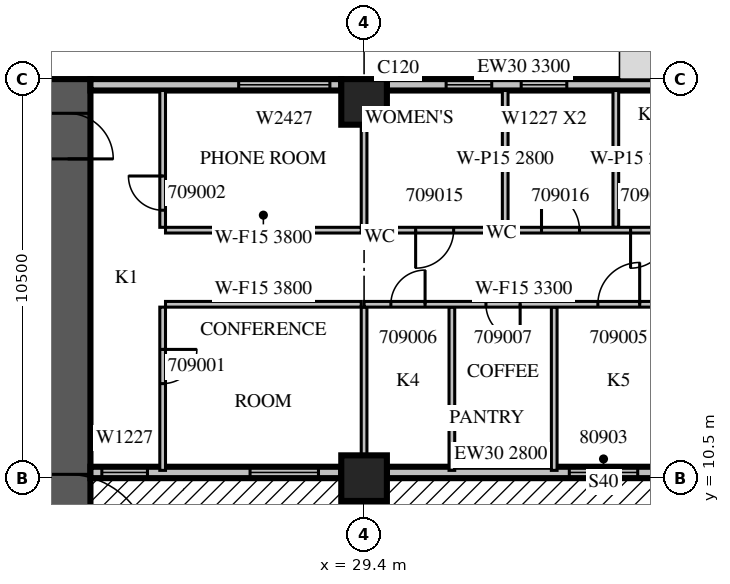
"""IFC4 building model, lengths in metres.
Left out: names, types, materials, properties, quantities, classifications, styles, units other than length and angle.
Written with IfcOpenShell. Run it as: python <this file> out.ifc"""

import sys

from ifc_helpers import new_model, si_unit, direction, frame, frame_2d, origin, origin_2d, place, context, subcontext, project, spatial, rectangle, extrude, source, transform, mapped, element, fill, save


model = new_model("IFC4")
c1 = context("Model", 3, precision=1e-05, world=origin(), true_north=direction((0.0, 1.0)))
c2 = subcontext(c1, "Body", "Model", "MODEL_VIEW")
j1 = project(units=[si_unit("LENGTHUNIT", "METRE"), si_unit("PLANEANGLEUNIT", "RADIAN")], contexts=[c1])
p1 = place(None, origin())
s1 = spatial("IfcSite", under=j1, at=p1, CompositionType="ELEMENT")
p2 = place(p1, origin())
s2 = spatial("IfcBuilding", under=s1, at=p2, CompositionType="ELEMENT")
p3 = place(p2, frame((0.0, 0.0, 48.9)))
s3 = spatial("IfcBuildingStorey", under=s2, at=p3, CompositionType="ELEMENT", Elevation=48.9)
m1 = source(origin(), c2, "Body", "SweptSolid", [
    extrude(rectangle(XDim=1.2, YDim=1.2, at=origin_2d()), origin(), (0.0, 0.0, 1.0), 4.2),
])
for number, where, z_axis, x_axis in (
    (1, (29.4, 10.5, 0.0), (0.0, 0.0, 1.0), (1.0, 0.0, 0.0)),
    (2, (29.4, 20.4, 0.0), (0.0, 0.0, 1.0), (1.0, 0.0, 0.0)),
):
    element("IfcColumn", number, at=place(p3, frame(where, z_axis=z_axis, x_axis=x_axis)), inside=s3, PredefinedType="COLUMN", context=c2, shape_type="MappedRepresentation", body=[
        mapped(m1, transform((0.0, 0.0, 0.0), scale=1.0)),
    ])
m2 = source(origin(), c2, "Body", "SweptSolid", [
    extrude(rectangle(XDim=16.8, YDim=1.2, at=frame_2d((8.4, 0.0))), origin(), (0.0, 0.0, 1.0), 4.2),
])
p4 = place(p3, frame((21.6, 4.2, 0.0), z_axis=(0.0, 0.0, 1.0), x_axis=(0.0, 1.0, 0.0)))
e3 = element("IfcWall", 3, at=p4, inside=s3, PredefinedType="SHEAR", context=c2, shape_type="MappedRepresentation", body=[
    mapped(m2, transform((0.0, 0.0, 0.0), scale=1.0)),
])
m3 = source(origin(), c2, "Body", "SweptSolid", [
    extrude(rectangle(XDim=2.2, YDim=2.1, at=frame_2d((1.1, 1.05))), frame((0.0, 0.61, 0.0), z_axis=(0.0, -1.0, 0.0), x_axis=(1.0, 0.0, 0.0)), (0.0, 0.0, 1.0), 1.22),
])
p5 = place(p4, frame((4.2, 0.0, 0.0)))
e4 = element("IfcOpeningElement", 4, at=p5, cuts=e3, PredefinedType="OPENING", context=c2, shape_type="MappedRepresentation", body=[
    mapped(m3, transform((0.0, 0.0, 0.0), scale=1.0)),
])
m4 = source(origin(), c2, "Body", "SweptSolid", [
    extrude(rectangle(XDim=1.2, YDim=2.1, at=frame_2d((0.6, 1.05))), frame((0.0, 0.61, 0.0), z_axis=(0.0, -1.0, 0.0), x_axis=(1.0, 0.0, 0.0)), (0.0, 0.0, 1.0), 1.22),
])
p6 = place(p4, frame((14.7, 0.0, 0.0)))
e5 = element("IfcOpeningElement", 5, at=p6, cuts=e3, PredefinedType="OPENING", context=c2, shape_type="MappedRepresentation", body=[
    mapped(m4, transform((0.0, 0.0, 0.0), scale=1.0)),
])
m5 = source(origin(), c2, "Body", "SweptSolid", [
    extrude(rectangle(XDim=6.6, YDim=0.3, at=frame_2d((3.3, 0.0))), origin(), (0.0, 0.0, 1.0), 3.8),
])
p7 = place(p3, frame((22.2, 10.65, 0.0), z_axis=(0.0, 0.0, 1.0), x_axis=(1.0, 0.0, 0.0)))
e6 = element("IfcWall", 6, at=p7, inside=s3, PredefinedType="STANDARD", context=c2, shape_type="MappedRepresentation", body=[
    mapped(m5, transform((0.0, 0.0, 0.0), scale=1.0)),
])
m6 = source(origin(), c2, "Body", "SweptSolid", [
    extrude(rectangle(XDim=1.2, YDim=2.7, at=frame_2d((0.6, 1.35))), frame((0.0, 0.16, 0.0), z_axis=(0.0, -1.0, 0.0), x_axis=(1.0, 0.0, 0.0)), (0.0, 0.0, 1.0), 0.32),
])
p8 = place(p7, frame((0.3, 0.0, 0.6)))
e7 = element("IfcOpeningElement", 7, at=p8, cuts=e6, PredefinedType="OPENING", context=c2, shape_type="MappedRepresentation", body=[
    mapped(m6, transform((0.0, 0.0, 0.0), scale=1.0)),
])
m7 = source(origin(), c2, "Body", "SweptSolid", [
    extrude(rectangle(XDim=1.8, YDim=2.4, at=frame_2d((0.9, 1.2))), frame((0.0, 0.16, 0.0), z_axis=(0.0, -1.0, 0.0), x_axis=(1.0, 0.0, 0.0)), (0.0, 0.0, 1.0), 0.32),
])
p9 = place(p7, frame((4.2, 0.0, 0.0)))
e8 = element("IfcOpeningElement", 8, at=p9, cuts=e6, PredefinedType="OPENING", context=c2, shape_type="MappedRepresentation", body=[
    mapped(m7, transform((0.0, 0.0, 0.0), scale=1.0)),
])
p10 = place(p3, frame((30.0, 10.65, 0.0), z_axis=(0.0, 0.0, 1.0), x_axis=(1.0, 0.0, 0.0)))
e9 = element("IfcWall", 9, at=p10, inside=s3, PredefinedType="STANDARD", context=c2, shape_type="SweptSolid", body=[
    extrude(rectangle(XDim=7.2, YDim=0.3, at=frame_2d((3.6, 0.0))), origin(), (0.0, 0.0, 1.0), 2.8),
])
p11 = place(p10, frame((4.8, 0.0, 0.0)))
e10 = element("IfcOpeningElement", 10, at=p11, cuts=e9, PredefinedType="OPENING", context=c2, shape_type="MappedRepresentation", body=[
    mapped(m7, transform((0.0, 0.0, 0.0), scale=1.0)),
])
m8 = source(origin(), c2, "Body", "SweptSolid", [
    extrude(rectangle(XDim=7.2, YDim=0.3, at=frame_2d((3.6, 0.0))), origin(), (0.0, 0.0, 1.0), 3.3),
])
p12 = place(p3, frame((37.2, 20.85, 0.0), z_axis=(0.0, 0.0, 1.0), x_axis=(-1.0, 0.0, 0.0)))
e11 = element("IfcWall", 11, at=p12, inside=s3, PredefinedType="STANDARD", context=c2, shape_type="MappedRepresentation", body=[
    mapped(m8, transform((0.0, 0.0, 0.0), scale=1.0)),
])
p13 = place(p12, frame((2.466, 0.0, 0.6)))
e12 = element("IfcOpeningElement", 12, at=p13, cuts=e11, PredefinedType="OPENING", context=c2, shape_type="MappedRepresentation", body=[
    mapped(m6, transform((0.0, 0.0, 0.0), scale=1.0)),
])
p14 = place(p12, frame((4.441, 0.0, 0.6)))
e13 = element("IfcOpeningElement", 13, at=p14, cuts=e11, PredefinedType="OPENING", context=c2, shape_type="MappedRepresentation", body=[
    mapped(m6, transform((0.0, 0.0, 0.0), scale=1.0)),
])
p15 = place(p3, frame((28.8, 20.85, 0.0), z_axis=(0.0, 0.0, 1.0), x_axis=(-1.0, 0.0, 0.0)))
e14 = element("IfcWall", 14, at=p15, inside=s3, PredefinedType="STANDARD", context=c2, shape_type="MappedRepresentation", body=[
    mapped(m5, transform((0.0, 0.0, 0.0), scale=1.0)),
])
m9 = source(origin(), c2, "Body", "SweptSolid", [
    extrude(rectangle(XDim=2.4, YDim=2.7, at=frame_2d((1.2, 1.35))), frame((0.0, 0.16, 0.0), z_axis=(0.0, -1.0, 0.0), x_axis=(1.0, 0.0, 0.0)), (0.0, 0.0, 1.0), 0.32),
])
p16 = place(p15, frame((0.3, 0.0, 0.6)))
e15 = element("IfcOpeningElement", 15, at=p16, cuts=e14, PredefinedType="OPENING", context=c2, shape_type="MappedRepresentation", body=[
    mapped(m9, transform((0.0, 0.0, 0.0), scale=1.0)),
])
p17 = place(p3, frame((24.1, 15.0, 0.0), z_axis=(0.0, 0.0, 1.0), x_axis=(0.0, -1.0, 0.0)))
e16 = element("IfcWall", 16, at=p17, inside=s3, PredefinedType="PARTITIONING", context=c2, shape_type="SweptSolid", body=[
    extrude(rectangle(XDim=4.295, YDim=0.15, at=frame_2d((2.147, 0.0))), origin(), (0.0, 0.0, 1.0), 3.8),
])
m10 = source(origin(), c2, "Body", "SweptSolid", [
    extrude(rectangle(XDim=0.9, YDim=2.1, at=frame_2d((0.45, 1.05))), frame((0.0, 0.085, 0.0), z_axis=(0.0, -1.0, 0.0), x_axis=(1.0, 0.0, 0.0)), (0.0, 0.0, 1.0), 0.17),
])
p18 = place(p17, frame((1.113, 0.0, 0.0)))
e17 = element("IfcOpeningElement", 17, at=p18, cuts=e16, PredefinedType="OPENING", context=c2, shape_type="MappedRepresentation", body=[
    mapped(m10, transform((0.0, 0.0, 0.0), scale=1.0)),
])
m11 = source(origin(), c2, "Body", "SweptSolid", [
    extrude(rectangle(XDim=3.6, YDim=0.15, at=frame_2d((1.8, 0.0))), origin(), (0.0, 0.0, 1.0), 3.8),
])
p19 = place(p3, frame((24.1, 20.7, 0.0), z_axis=(0.0, 0.0, 1.0), x_axis=(0.0, -1.0, 0.0)))
e18 = element("IfcWall", 18, at=p19, inside=s3, PredefinedType="PARTITIONING", context=c2, shape_type="MappedRepresentation", body=[
    mapped(m11, transform((0.0, 0.0, 0.0), scale=1.0)),
])
p20 = place(p19, frame((2.25, 0.0, 0.0)))
e19 = element("IfcOpeningElement", 19, at=p20, cuts=e18, PredefinedType="OPENING", context=c2, shape_type="MappedRepresentation", body=[
    mapped(m10, transform((0.0, 0.0, 0.0), scale=1.0)),
])
m12 = source(origin(), c2, "Body", "SweptSolid", [
    extrude(rectangle(XDim=5.15, YDim=0.15, at=frame_2d((2.575, 0.0))), origin(), (0.0, 0.0, 1.0), 3.8),
])
for number, where, z_axis, x_axis in (
    (20, (29.325, 15.075, 0.0), (0.0, 0.0, 1.0), (-1.0, 0.0, 0.0)),
    (21, (24.175, 17.025, 0.0), (0.0, 0.0, 1.0), (1.0, 0.0, 0.0)),
):
    element("IfcWall", number, at=place(p3, frame(where, z_axis=z_axis, x_axis=x_axis)), inside=s3, PredefinedType="PARTITIONING", context=c2, shape_type="MappedRepresentation", body=[
        mapped(m12, transform((0.0, 0.0, 0.0), scale=1.0)),
    ])
m13 = source(origin(), c2, "Body", "SweptSolid", [
    extrude(rectangle(XDim=3.901, YDim=0.15, at=frame_2d((1.95, 0.0))), origin(), (0.0, 0.0, 1.0), 3.8),
])
p21 = place(p3, frame((29.4, 11.099, 0.0), z_axis=(0.0, 0.0, 1.0), x_axis=(0.0, 1.0, 0.0)))
e22 = element("IfcWall", 22, at=p21, inside=s3, PredefinedType="PARTITIONING", context=c2, shape_type="MappedRepresentation", body=[
    mapped(m13, transform((0.0, 0.0, 0.0), scale=1.0)),
])
m14 = source(origin(), c2, "Body", "SweptSolid", [
    extrude(rectangle(XDim=2.701, YDim=0.15, at=frame_2d((1.351, 0.0))), origin(), (0.0, 0.0, 1.0), 3.8),
])
p22 = place(p3, frame((29.4, 17.1, 0.0), z_axis=(0.0, 0.0, 1.0), x_axis=(0.0, 1.0, 0.0)))
e23 = element("IfcWall", 23, at=p22, inside=s3, PredefinedType="PARTITIONING", context=c2, shape_type="MappedRepresentation", body=[
    mapped(m14, transform((0.0, 0.0, 0.0), scale=1.0)),
])
m15 = source(origin(), c2, "Body", "SweptSolid", [
    extrude(rectangle(XDim=4.295, YDim=0.15, at=frame_2d((2.147, 0.0))), origin(), (0.0, 0.0, 1.0), 3.8),
])
for number, where, z_axis, x_axis in (
    (24, (31.71, 10.705, 0.0), (0.0, 0.0, 1.0), (0.0, 1.0, 0.0)),
    (25, (34.403, 10.705, 0.0), (0.0, 0.0, 1.0), (0.0, 1.0, 0.0)),
):
    element("IfcWall", number, at=place(p3, frame(where, z_axis=z_axis, x_axis=x_axis)), inside=s3, PredefinedType="PARTITIONING", context=c2, shape_type="MappedRepresentation", body=[
        mapped(m15, transform((0.0, 0.0, 0.0), scale=1.0)),
    ])
m16 = source(origin(), c2, "Body", "SweptSolid", [
    extrude(rectangle(XDim=3.6, YDim=0.15, at=frame_2d((1.8, 0.0))), origin(), (0.0, 0.0, 1.0), 2.8),
])
for number, where, z_axis, x_axis in (
    (26, (33.113, 20.7, 0.0), (0.0, 0.0, 1.0), (0.0, -1.0, 0.0)),
    (27, (36.024, 20.7, 0.0), (0.0, 0.0, 1.0), (0.0, -1.0, 0.0)),
):
    element("IfcWall", number, at=place(p3, frame(where, z_axis=z_axis, x_axis=x_axis)), inside=s3, PredefinedType="PARTITIONING", context=c2, shape_type="MappedRepresentation", body=[
        mapped(m16, transform((0.0, 0.0, 0.0), scale=1.0)),
    ])
m17 = source(origin(), c2, "Body", "SweptSolid", [
    extrude(rectangle(XDim=8.4, YDim=0.15, at=frame_2d((4.2, 0.0))), origin(), (0.0, 0.0, 1.0), 3.3),
])
p23 = place(p3, frame((37.8, 15.075, 0.0), z_axis=(0.0, 0.0, 1.0), x_axis=(-1.0, 0.0, 0.0)))
e28 = element("IfcWall", 28, at=p23, inside=s3, PredefinedType="PARTITIONING", context=c2, shape_type="MappedRepresentation", body=[
    mapped(m17, transform((0.0, 0.0, 0.0), scale=1.0)),
])
m18 = source(origin(), c2, "Body", "SweptSolid", [
    extrude(rectangle(XDim=1.1, YDim=2.1, at=frame_2d((0.55, 1.05))), frame((0.0, 0.085, 0.0), z_axis=(0.0, -1.0, 0.0), x_axis=(1.0, 0.0, 0.0)), (0.0, 0.0, 1.0), 0.17),
])
p24 = place(p23, frame((1.149, 0.0, 0.0)))
e29 = element("IfcOpeningElement", 29, at=p24, cuts=e28, PredefinedType="OPENING", context=c2, shape_type="MappedRepresentation", body=[
    mapped(m18, transform((0.0, 0.0, 0.0), scale=1.0)),
])
p25 = place(p23, frame((6.795, 0.0, 0.0)))
e30 = element("IfcOpeningElement", 30, at=p25, cuts=e28, PredefinedType="OPENING", context=c2, shape_type="MappedRepresentation", body=[
    mapped(m10, transform((0.0, 0.0, 0.0), scale=1.0)),
])
p26 = place(p23, frame((4.293, 0.0, 0.0)))
e31 = element("IfcOpeningElement", 31, at=p26, cuts=e28, PredefinedType="OPENING", context=c2, shape_type="MappedRepresentation", body=[
    mapped(m10, transform((0.0, 0.0, 0.0), scale=1.0)),
])
m19 = source(origin(), c2, "Body", "SweptSolid", [
    extrude(rectangle(XDim=37.5, YDim=0.15, at=frame_2d((18.75, 0.0))), origin(), (0.0, 0.0, 1.0), 3.3),
])
p27 = place(p3, frame((29.4, 17.025, 0.0), z_axis=(0.0, 0.0, 1.0), x_axis=(1.0, 0.0, 0.0)))
e32 = element("IfcWall", 32, at=p27, inside=s3, PredefinedType="PARTITIONING", context=c2, shape_type="MappedRepresentation", body=[
    mapped(m19, transform((0.0, 0.0, 0.0), scale=1.0)),
])
m20 = source(origin(), c2, "Body", "SweptSolid", [
    extrude(rectangle(XDim=1.0, YDim=2.1, at=frame_2d((0.5, 1.05))), frame((0.0, 0.085, 0.0), z_axis=(0.0, -1.0, 0.0), x_axis=(1.0, 0.0, 0.0)), (0.0, 0.0, 1.0), 0.17),
])
p28 = place(p27, frame((1.357, 0.0, 0.0)))
e33 = element("IfcOpeningElement", 33, at=p28, cuts=e32, PredefinedType="OPENING", context=c2, shape_type="MappedRepresentation", body=[
    mapped(m20, transform((0.0, 0.0, 0.0), scale=1.0)),
])
p29 = place(p27, frame((4.669, 0.0, 0.0)))
e34 = element("IfcOpeningElement", 34, at=p29, cuts=e32, PredefinedType="OPENING", context=c2, shape_type="MappedRepresentation", body=[
    mapped(m20, transform((0.0, 0.0, 0.0), scale=1.0)),
])
p30 = place(p27, frame((7.012, 0.0, 0.0)))
e35 = element("IfcOpeningElement", 35, at=p30, cuts=e32, PredefinedType="OPENING", context=c2, shape_type="MappedRepresentation", body=[
    mapped(m20, transform((0.0, 0.0, 0.0), scale=1.0)),
])
p31 = place(p27, frame((10.05, 0.0, 0.0)))
e36 = element("IfcOpeningElement", 36, at=p31, cuts=e32, PredefinedType="OPENING", context=c2, shape_type="MappedRepresentation", body=[
    mapped(m10, transform((0.0, 0.0, 0.0), scale=1.0)),
])
p32 = place(p27, frame((13.401, 0.0, 0.0)))
e37 = element("IfcOpeningElement", 37, at=p32, cuts=e32, PredefinedType="OPENING", context=c2, shape_type="MappedRepresentation", body=[
    mapped(m10, transform((0.0, 0.0, 0.0), scale=1.0)),
])
p33 = place(p27, frame((15.501, 0.0, 0.0)))
e38 = element("IfcOpeningElement", 38, at=p33, cuts=e32, PredefinedType="OPENING", context=c2, shape_type="MappedRepresentation", body=[
    mapped(m10, transform((0.0, 0.0, 0.0), scale=1.0)),
])
p34 = place(p27, frame((18.898, 0.0, 0.0)))
e39 = element("IfcOpeningElement", 39, at=p34, cuts=e32, PredefinedType="OPENING", context=c2, shape_type="MappedRepresentation", body=[
    mapped(m20, transform((0.0, 0.0, 0.0), scale=1.0)),
])
p35 = place(p27, frame((23.543, 0.0, 0.0)))
e40 = element("IfcOpeningElement", 40, at=p35, cuts=e32, PredefinedType="OPENING", context=c2, shape_type="MappedRepresentation", body=[
    mapped(m20, transform((0.0, 0.0, 0.0), scale=1.0)),
])
p36 = place(p27, frame((26.826, 0.0, 0.0)))
e41 = element("IfcOpeningElement", 41, at=p36, cuts=e32, PredefinedType="OPENING", context=c2, shape_type="MappedRepresentation", body=[
    mapped(m20, transform((0.0, 0.0, 0.0), scale=1.0)),
])
p37 = place(p27, frame((30.364, 0.0, 0.0)))
e42 = element("IfcOpeningElement", 42, at=p37, cuts=e32, PredefinedType="OPENING", context=c2, shape_type="MappedRepresentation", body=[
    mapped(m10, transform((0.0, 0.0, 0.0), scale=1.0)),
])
p38 = place(p27, frame((34.871, 0.0, 0.0)))
e43 = element("IfcOpeningElement", 43, at=p38, cuts=e32, PredefinedType="OPENING", context=c2, shape_type="MappedRepresentation", body=[
    mapped(m10, transform((0.0, 0.0, 0.0), scale=1.0)),
])
m21 = source(origin(), c2, "Body", "SweptSolid", [
    extrude(rectangle(XDim=1.2, YDim=2.7, at=frame_2d((0.6, 1.35))), frame((0.0, 0.03, 0.0), z_axis=(0.0, -1.0, 0.0), x_axis=(1.0, 0.0, 0.0)), (0.0, 0.0, 1.0), 0.06),
])
p39 = place(p8, origin())
e44 = element("IfcWindow", 44, at=p39, inside=s3, PartitioningType="SINGLE_PANEL", PredefinedType="WINDOW", context=c2, shape_type="MappedRepresentation", body=[
    mapped(m21, transform((0.0, 0.0, 0.0), scale=1.0)),
])
fill(e7, e44)
m22 = source(origin(), c2, "Body", "SweptSolid", [
    extrude(rectangle(XDim=1.8, YDim=2.4, at=frame_2d((0.9, 1.2))), frame((0.0, 0.025, 0.0), z_axis=(0.0, -1.0, 0.0), x_axis=(1.0, 0.0, 0.0)), (0.0, 0.0, 1.0), 0.05),
])
p40 = place(p9, origin())
e45 = element("IfcDoor", 45, at=p40, inside=s3, OperationType="SLIDING_TO_LEFT", PredefinedType="DOOR", context=c2, shape_type="MappedRepresentation", body=[
    mapped(m22, transform((0.0, 0.0, 0.0), scale=1.0)),
])
fill(e8, e45)
p41 = place(p11, origin())
e46 = element("IfcDoor", 46, at=p41, inside=s3, OperationType="SLIDING_TO_LEFT", PredefinedType="DOOR", context=c2, shape_type="MappedRepresentation", body=[
    mapped(m22, transform((0.0, 0.0, 0.0), scale=1.0)),
])
fill(e10, e46)
p42 = place(p13, origin())
e47 = element("IfcWindow", 47, at=p42, inside=s3, PartitioningType="SINGLE_PANEL", PredefinedType="WINDOW", context=c2, shape_type="MappedRepresentation", body=[
    mapped(m21, transform((0.0, 0.0, 0.0), scale=1.0)),
])
fill(e12, e47)
p43 = place(p14, origin())
e48 = element("IfcWindow", 48, at=p43, inside=s3, PartitioningType="SINGLE_PANEL", PredefinedType="WINDOW", context=c2, shape_type="MappedRepresentation", body=[
    mapped(m21, transform((0.0, 0.0, 0.0), scale=1.0)),
])
fill(e13, e48)
m23 = source(origin(), c2, "Body", "SweptSolid", [
    extrude(rectangle(XDim=2.4, YDim=2.7, at=frame_2d((1.2, 1.35))), frame((0.0, 0.03, 0.0), z_axis=(0.0, -1.0, 0.0), x_axis=(1.0, 0.0, 0.0)), (0.0, 0.0, 1.0), 0.06),
])
p44 = place(p16, origin())
e49 = element("IfcWindow", 49, at=p44, inside=s3, PartitioningType="SINGLE_PANEL", PredefinedType="WINDOW", context=c2, shape_type="MappedRepresentation", body=[
    mapped(m23, transform((0.0, 0.0, 0.0), scale=1.0)),
])
fill(e15, e49)
m24 = source(origin(), c2, "Body", "SweptSolid", [
    extrude(rectangle(XDim=2.2, YDim=2.1, at=frame_2d((1.1, 1.05))), frame((0.0, 0.025, 0.0), z_axis=(0.0, -1.0, 0.0), x_axis=(1.0, 0.0, 0.0)), (0.0, 0.0, 1.0), 0.05),
])
p45 = place(p5, origin())
e50 = element("IfcDoor", 50, at=p45, inside=s3, OperationType="DOUBLE_DOOR_SINGLE_SWING", PredefinedType="DOOR", context=c2, shape_type="MappedRepresentation", body=[
    mapped(m24, transform((0.0, 0.0, 0.0), scale=1.0)),
])
fill(e4, e50)
m25 = source(origin(), c2, "Body", "SweptSolid", [
    extrude(rectangle(XDim=1.2, YDim=2.1, at=frame_2d((0.6, 1.05))), frame((0.0, 0.025, 0.0), z_axis=(0.0, -1.0, 0.0), x_axis=(1.0, 0.0, 0.0)), (0.0, 0.0, 1.0), 0.05),
])
p46 = place(p6, origin())
e51 = element("IfcDoor", 51, at=p46, inside=s3, OperationType="SINGLE_SWING_RIGHT", PredefinedType="DOOR", context=c2, shape_type="MappedRepresentation", body=[
    mapped(m25, transform((0.0, 0.0, 0.0), scale=1.0)),
])
fill(e5, e51)
m26 = source(origin(), c2, "Body", "SweptSolid", [
    extrude(rectangle(XDim=0.9, YDim=2.1, at=frame_2d((0.45, 1.05))), frame((0.0, 0.025, 0.0), z_axis=(0.0, -1.0, 0.0), x_axis=(1.0, 0.0, 0.0)), (0.0, 0.0, 1.0), 0.05),
])
p47 = place(p18, origin())
e52 = element("IfcDoor", 52, at=p47, inside=s3, OperationType="SINGLE_SWING_LEFT", PredefinedType="DOOR", context=c2, shape_type="MappedRepresentation", body=[
    mapped(m26, transform((0.0, 0.0, 0.0), scale=1.0)),
])
fill(e17, e52)
p48 = place(p20, origin())
e53 = element("IfcDoor", 53, at=p48, inside=s3, OperationType="SINGLE_SWING_RIGHT", PredefinedType="DOOR", context=c2, shape_type="MappedRepresentation", body=[
    mapped(m26, transform((0.0, 0.0, 0.0), scale=1.0)),
])
fill(e19, e53)
m27 = source(origin(), c2, "Body", "SweptSolid", [
    extrude(rectangle(XDim=1.1, YDim=2.1, at=frame_2d((0.55, 1.05))), frame((0.0, 0.025, 0.0), z_axis=(0.0, -1.0, 0.0), x_axis=(1.0, 0.0, 0.0)), (0.0, 0.0, 1.0), 0.05),
])
p49 = place(p24, origin())
e54 = element("IfcDoor", 54, at=p49, inside=s3, OperationType="SINGLE_SWING_RIGHT", PredefinedType="DOOR", context=c2, shape_type="MappedRepresentation", body=[
    mapped(m27, transform((0.0, 0.0, 0.0), scale=1.0)),
])
fill(e29, e54)
p50 = place(p25, origin())
e55 = element("IfcDoor", 55, at=p50, inside=s3, OperationType="SINGLE_SWING_RIGHT", PredefinedType="DOOR", context=c2, shape_type="MappedRepresentation", body=[
    mapped(m26, transform((0.0, 0.0, 0.0), scale=1.0)),
])
fill(e30, e55)
p51 = place(p26, origin())
e56 = element("IfcDoor", 56, at=p51, inside=s3, OperationType="SINGLE_SWING_LEFT", PredefinedType="DOOR", context=c2, shape_type="MappedRepresentation", body=[
    mapped(m26, transform((0.0, 0.0, 0.0), scale=1.0)),
])
fill(e31, e56)
m28 = source(origin(), c2, "Body", "SweptSolid", [
    extrude(rectangle(XDim=1.0, YDim=2.1, at=frame_2d((0.5, 1.05))), frame((0.0, 0.025, 0.0), z_axis=(0.0, -1.0, 0.0), x_axis=(1.0, 0.0, 0.0)), (0.0, 0.0, 1.0), 0.05),
])
p52 = place(p28, origin())
e57 = element("IfcDoor", 57, at=p52, inside=s3, OperationType="SINGLE_SWING_RIGHT", PredefinedType="DOOR", context=c2, shape_type="MappedRepresentation", body=[
    mapped(m28, transform((0.0, 0.0, 0.0), scale=1.0)),
])
fill(e33, e57)
p53 = place(p29, origin())
e58 = element("IfcDoor", 58, at=p53, inside=s3, OperationType="SINGLE_SWING_LEFT", PredefinedType="DOOR", context=c2, shape_type="MappedRepresentation", body=[
    mapped(m28, transform((0.0, 0.0, 0.0), scale=1.0)),
])
fill(e34, e58)
p54 = place(p30, origin())
e59 = element("IfcDoor", 59, at=p54, inside=s3, OperationType="SINGLE_SWING_RIGHT", PredefinedType="DOOR", context=c2, shape_type="MappedRepresentation", body=[
    mapped(m28, transform((0.0, 0.0, 0.0), scale=1.0)),
])
fill(e35, e59)
save(model, sys.argv[1])
